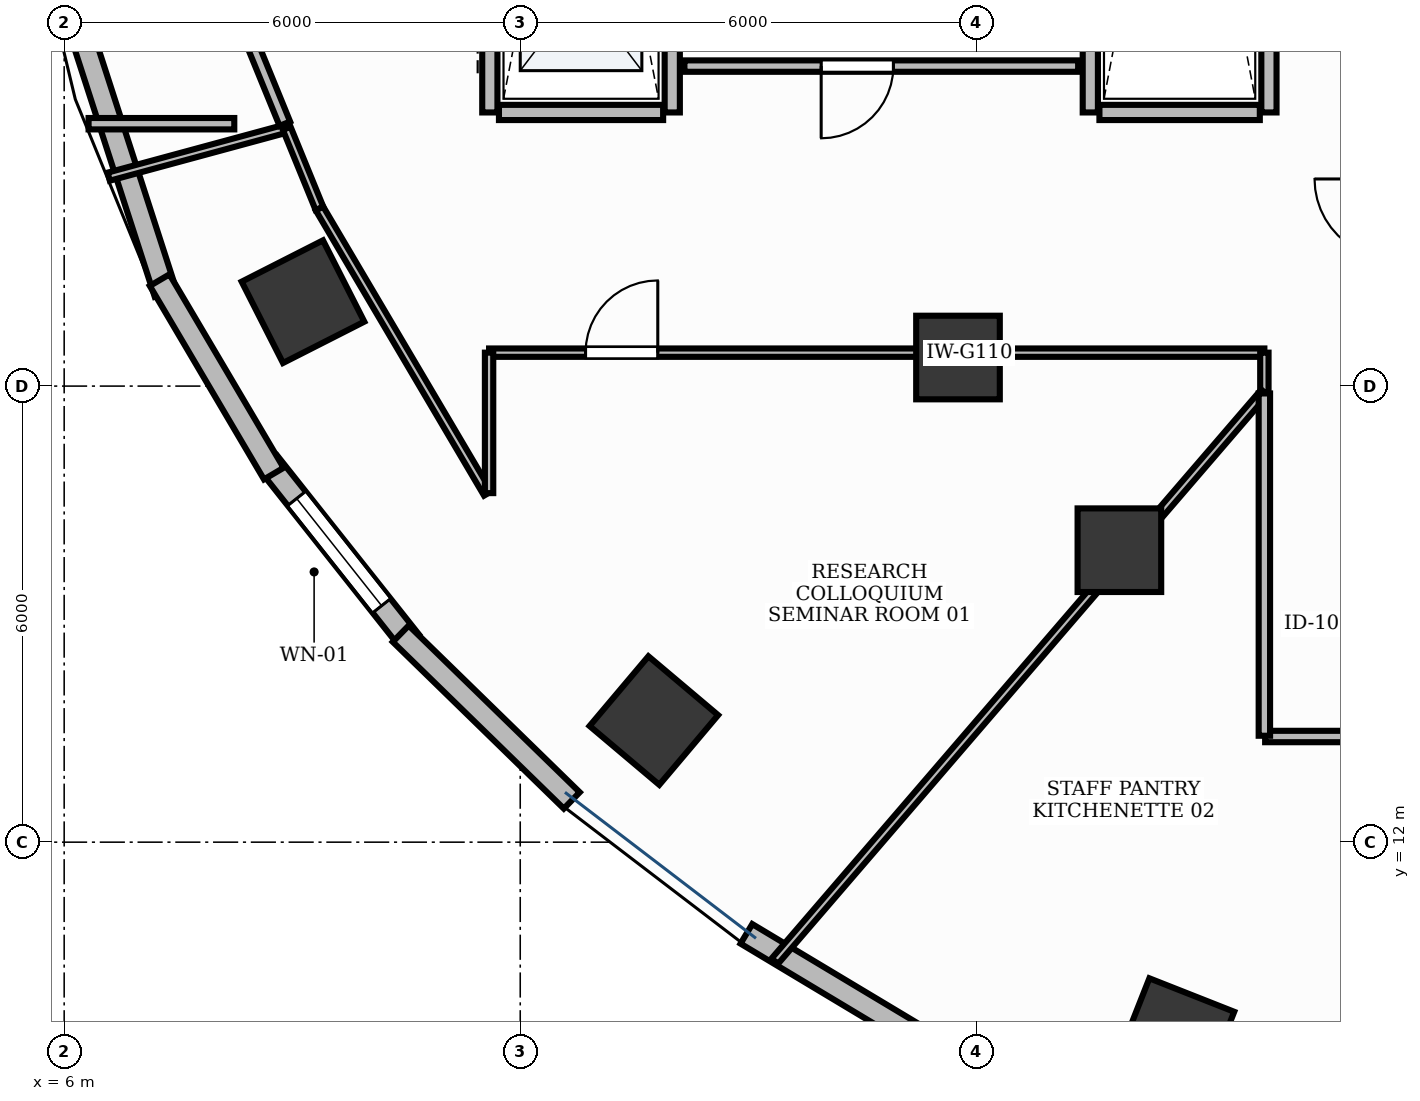
"""IFC4 building model, lengths in metres.
Left out: names, types, materials, properties, quantities, classifications, styles, units other than length and angle.
Written with IfcOpenShell. Run it as: python <this file> out.ifc"""

import sys

from ifc_helpers import new_model, si_unit, direction, frame, frame_2d, origin, origin_2d, place, context, subcontext, project, spatial, rectangle, extrude, element, fill, save


model = new_model("IFC4")
c1 = context("Model", 3, precision=1e-05, world=origin(), true_north=direction((0.0, 1.0)))
c2 = subcontext(c1, "Body", "Model", "MODEL_VIEW")
j1 = project(units=[si_unit("LENGTHUNIT", "METRE"), si_unit("PLANEANGLEUNIT", "RADIAN")], contexts=[c1])
p1 = place(None, origin())
s1 = spatial("IfcSite", under=j1, at=p1, CompositionType="ELEMENT")
p2 = place(p1, origin())
s2 = spatial("IfcBuilding", under=s1, at=p2, CompositionType="ELEMENT")
p3 = place(p2, frame((0.0, 0.0, 111.0)))
s3 = spatial("IfcBuildingStorey", under=s2, at=p3, CompositionType="ELEMENT", Elevation=111.0)
p4 = place(p3, frame((9.142, 19.111, -0.0), z_axis=(0.0, 0.0, 1.0), x_axis=(-0.453057191132, 0.891481453292, 0.0)))
e1 = element("IfcColumn", 1, at=p4, inside=s3, PredefinedType="COLUMN", context=c2, shape_type="SweptSolid", body=[
    extrude(rectangle(XDim=1.2, YDim=1.2, at=origin_2d()), origin(), (0.0, 0.0, 1.0), 3.901),
])
p5 = place(p3, frame((17.759, 18.376, -0.0), z_axis=(0.0, 0.0, 1.0), x_axis=(1.0, 0.0, 0.0)))
e2 = element("IfcColumn", 2, at=p5, inside=s3, PredefinedType="COLUMN", context=c2, shape_type="SweptSolid", body=[
    extrude(rectangle(XDim=1.1, YDim=1.1, at=origin_2d()), origin(), (0.0, 0.0, 1.0), 3.901),
])
p6 = place(p3, frame((13.758, 13.6, -0.0), z_axis=(0.0, 0.0, 1.0), x_axis=(-0.764246456939, 0.644924300253, 0.0)))
e3 = element("IfcColumn", 3, at=p6, inside=s3, PredefinedType="COLUMN", context=c2, shape_type="SweptSolid", body=[
    extrude(rectangle(XDim=1.2, YDim=1.2, at=origin_2d()), origin(), (0.0, 0.0, 1.0), 3.901),
])
p7 = place(p3, frame((19.883, 15.841, -0.0), z_axis=(0.0, 0.0, 1.0), x_axis=(1.0, 0.0, 0.0)))
e4 = element("IfcColumn", 4, at=p7, inside=s3, PredefinedType="COLUMN", context=c2, shape_type="SweptSolid", body=[
    extrude(rectangle(XDim=1.1, YDim=1.1, at=origin_2d()), origin(), (0.0, 0.0, 1.0), 3.901),
])
p8 = place(p3, frame((20.615, 9.431, -0.0), z_axis=(0.0, 0.0, 1.0), x_axis=(-0.930225540858, 0.366988341962, 0.0)))
e5 = element("IfcColumn", 5, at=p8, inside=s3, PredefinedType="COLUMN", context=c2, shape_type="SweptSolid", body=[
    extrude(rectangle(XDim=1.2, YDim=1.2, at=origin_2d()), origin(), (0.0, 0.0, 1.0), 3.901),
])
p9 = place(p3, frame((8.685, 16.993, 0.0), z_axis=(0.0, 0.0, 1.0), x_axis=(0.620971431761, -0.783833197139, 0.0)))
e6 = element("IfcWall", 6, at=p9, inside=s3, PredefinedType="STANDARD", context=c2, shape_type="SweptSolid", body=[
    extrude(rectangle(XDim=3.004, YDim=0.3, at=frame_2d((1.502, 0.0))), origin(), (0.0, 0.0, 1.0), 3.9),
])
p10 = place(p9, frame((0.602, 0.0, 0.9)))
e7 = element("IfcOpeningElement", 7, at=p10, cuts=e6, PredefinedType="OPENING", context=c2, shape_type="SweptSolid", body=[
    extrude(rectangle(XDim=1.8, YDim=2.1, at=frame_2d((0.9, 1.05))), frame((0.0, 0.165, 0.0), z_axis=(0.0, -1.0, 0.0), x_axis=(1.0, 0.0, 0.0)), (0.0, 0.0, 1.0), 0.33),
])
p11 = place(p3, frame((5.632, 24.487, 0.0), z_axis=(0.0, 0.0, 1.0), x_axis=(0.307599470659, -0.951515930319, 0.0)))
e8 = element("IfcWall", 8, at=p11, inside=s3, PredefinedType="STANDARD", context=c2, shape_type="SweptSolid", body=[
    extrude(rectangle(XDim=5.534, YDim=0.3, at=frame_2d((2.767, 0.0))), origin(), (0.0, 0.0, 1.0), 3.9),
])
p12 = place(p3, frame((7.256, 19.394, 0.0), z_axis=(0.0, 0.0, 1.0), x_axis=(0.508200342003, -0.861238882302, 0.0)))
e9 = element("IfcWall", 9, at=p12, inside=s3, PredefinedType="STANDARD", context=c2, shape_type="SweptSolid", body=[
    extrude(rectangle(XDim=2.955, YDim=0.3, at=frame_2d((1.478, 0.0))), origin(), (0.0, 0.0, 1.0), 3.47),
])
p13 = place(p3, frame((10.428, 14.742, 0.0), z_axis=(0.0, 0.0, 1.0), x_axis=(0.716101112291, -0.69799655943, 0.0)))
e10 = element("IfcWall", 10, at=p13, inside=s3, PredefinedType="STANDARD", context=c2, shape_type="SweptSolid", body=[
    extrude(rectangle(XDim=3.142, YDim=0.3, at=frame_2d((1.571, 0.0))), origin(), (0.0, 0.0, 1.0), 3.47),
])
p14 = place(p3, frame((14.976, 10.794, 0.0), z_axis=(0.0, 0.0, 1.0), x_axis=(0.857602536704, -0.514313026316, 0.0)))
e11 = element("IfcWall", 11, at=p14, inside=s3, PredefinedType="STANDARD", context=c2, shape_type="SweptSolid", body=[
    extrude(rectangle(XDim=3.34, YDim=0.3, at=frame_2d((1.67, 0.0))), origin(), (0.0, 0.0, 1.0), 3.9),
])
p15 = place(p3, frame((11.6, 21.6, 0.0), z_axis=(0.0, 0.0, 1.0), x_axis=(0.0, 1.0, 0.0)))
e12 = element("IfcWall", 12, at=p15, inside=s3, PredefinedType="PARTITIONING", context=c2, shape_type="SweptSolid", body=[
    extrude(rectangle(XDim=10.8, YDim=0.2, at=frame_2d((5.4, 0.0))), origin(), (0.0, 0.0, 1.0), 2.91),
])
p16 = place(p15, frame((0.9, 0.0, 0.0)))
e13 = element("IfcOpeningElement", 13, at=p16, cuts=e12, PredefinedType="OPENING", context=c2, shape_type="SweptSolid", body=[
    extrude(rectangle(XDim=1.1, YDim=2.2, at=frame_2d((0.55, 1.1))), frame((0.0, 0.115, 0.0), z_axis=(0.0, -1.0, 0.0), x_axis=(1.0, 0.0, 0.0)), (0.0, 0.0, 1.0), 0.23),
])
p17 = place(p15, frame((3.6, 0.0, 0.0)))
e14 = element("IfcOpeningElement", 14, at=p17, cuts=e12, PredefinedType="OPENING", context=c2, shape_type="SweptSolid", body=[
    extrude(rectangle(XDim=1.1, YDim=2.2, at=frame_2d((0.55, 1.1))), frame((0.0, 0.115, 0.0), z_axis=(0.0, -1.0, 0.0), x_axis=(1.0, 0.0, 0.0)), (0.0, 0.0, 1.0), 0.23),
])
p18 = place(p15, frame((6.3, 0.0, 0.0)))
e15 = element("IfcOpeningElement", 15, at=p18, cuts=e12, PredefinedType="OPENING", context=c2, shape_type="SweptSolid", body=[
    extrude(rectangle(XDim=1.1, YDim=2.2, at=frame_2d((0.55, 1.1))), frame((0.0, 0.115, 0.0), z_axis=(0.0, -1.0, 0.0), x_axis=(1.0, 0.0, 0.0)), (0.0, 0.0, 1.0), 0.23),
])
p19 = place(p15, frame((9.0, 0.0, 0.0)))
e16 = element("IfcOpeningElement", 16, at=p19, cuts=e12, PredefinedType="OPENING", context=c2, shape_type="SweptSolid", body=[
    extrude(rectangle(XDim=1.1, YDim=2.2, at=frame_2d((0.55, 1.1))), frame((0.0, 0.115, 0.0), z_axis=(0.0, -1.0, 0.0), x_axis=(1.0, 0.0, 0.0)), (0.0, 0.0, 1.0), 0.23),
])
p20 = place(p3, frame((14.0, 21.6, 0.0), z_axis=(0.0, 0.0, 1.0), x_axis=(0.0, 1.0, 0.0)))
e17 = element("IfcWall", 17, at=p20, inside=s3, PredefinedType="PARTITIONING", context=c2, shape_type="SweptSolid", body=[
    extrude(rectangle(XDim=10.8, YDim=0.2, at=frame_2d((5.4, 0.0))), origin(), (0.0, 0.0, 1.0), 2.91),
])
p21 = place(p3, frame((11.72, 21.6, 0.0), z_axis=(0.0, 0.0, 1.0), x_axis=(1.0, 0.0, 0.0)))
e18 = element("IfcWall", 18, at=p21, inside=s3, PredefinedType="PARTITIONING", context=c2, shape_type="SweptSolid", body=[
    extrude(rectangle(XDim=2.16, YDim=0.2, at=frame_2d((1.08, 0.0))), origin(), (0.0, 0.0, 1.0), 2.91),
])
for number, where, z_axis, x_axis in (
    (19, (19.5, 21.6, 0.0), (0.0, 0.0, 1.0), (0.0, 1.0, 0.0)),
    (20, (21.85, 21.6, 0.0), (0.0, 0.0, 1.0), (0.0, 1.0, 0.0)),
):
    element("IfcWall", number, at=place(p3, frame(where, z_axis=z_axis, x_axis=x_axis)), inside=s3, PredefinedType="PARTITIONING", context=c2, shape_type="SweptSolid", body=[
        extrude(rectangle(XDim=10.8, YDim=0.2, at=frame_2d((5.4, 0.0))), origin(), (0.0, 0.0, 1.0), 2.91),
    ])
p22 = place(p3, frame((19.62, 21.6, 0.0), z_axis=(0.0, 0.0, 1.0), x_axis=(1.0, 0.0, 0.0)))
e21 = element("IfcWall", 21, at=p22, inside=s3, PredefinedType="PARTITIONING", context=c2, shape_type="SweptSolid", body=[
    extrude(rectangle(XDim=2.11, YDim=0.2, at=frame_2d((1.055, 0.0))), origin(), (0.0, 0.0, 1.0), 2.91),
])
p23 = place(p3, frame((11.59, 18.44, 0.0), z_axis=(0.0, 0.0, 1.0), x_axis=(1.0, 0.0, 0.0)))
e22 = element("IfcWall", 22, at=p23, inside=s3, PredefinedType="MOVABLE", context=c2, shape_type="SweptSolid", body=[
    extrude(rectangle(XDim=10.2, YDim=0.11, at=frame_2d((5.1, 0.0))), origin(), (0.0, 0.0, 1.0), 2.91),
])
p24 = place(p23, frame((1.27, 0.0, 0.0)))
e23 = element("IfcOpeningElement", 23, at=p24, cuts=e22, PredefinedType="OPENING", context=c2, shape_type="SweptSolid", body=[
    extrude(rectangle(XDim=0.95, YDim=2.15, at=frame_2d((0.475, 1.075))), frame((0.0, 0.07, 0.0), z_axis=(0.0, -1.0, 0.0), x_axis=(1.0, 0.0, 0.0)), (0.0, 0.0, 1.0), 0.14),
])
p25 = place(p3, frame((21.8, 13.39, 0.0), z_axis=(0.0, 0.0, 1.0), x_axis=(1.0, 0.0, 0.0)))
e24 = element("IfcWall", 24, at=p25, inside=s3, PredefinedType="PARTITIONING", context=c2, shape_type="SweptSolid", body=[
    extrude(rectangle(XDim=4.159, YDim=0.15, at=frame_2d((2.079, 0.0))), origin(), (0.0, 0.0, 1.0), 2.91),
])
p26 = place(p25, frame((1.052, 0.0, 0.0)))
e25 = element("IfcOpeningElement", 25, at=p26, cuts=e24, PredefinedType="OPENING", context=c2, shape_type="SweptSolid", body=[
    extrude(rectangle(XDim=0.95, YDim=2.15, at=frame_2d((0.475, 1.075))), frame((0.0, 0.09, 0.0), z_axis=(0.0, -1.0, 0.0), x_axis=(1.0, 0.0, 0.0)), (0.0, 0.0, 1.0), 0.18),
])
p27 = place(p3, frame((19.34, 22.21, 0.0), z_axis=(0.0, 0.0, 1.0), x_axis=(-1.0, 0.0, 0.0)))
e26 = element("IfcWall", 26, at=p27, inside=s3, PredefinedType="PARTITIONING", context=c2, shape_type="SweptSolid", body=[
    extrude(rectangle(XDim=5.18, YDim=0.15, at=frame_2d((2.59, 0.0))), origin(), (0.0, 0.0, 1.0), 2.91),
])
p28 = place(p27, frame((2.431, 0.0, 0.0)))
e27 = element("IfcOpeningElement", 27, at=p28, cuts=e26, PredefinedType="OPENING", context=c2, shape_type="SweptSolid", body=[
    extrude(rectangle(XDim=0.95, YDim=2.15, at=frame_2d((0.475, 1.075))), frame((0.0, 0.09, 0.0), z_axis=(0.0, -1.0, 0.0), x_axis=(1.0, 0.0, 0.0)), (0.0, 0.0, 1.0), 0.18),
])
p29 = place(p3, frame((6.586, 20.755, 0.0), z_axis=(0.0, 0.0, 1.0), x_axis=(0.965145928014, 0.26171231847, 0.0)))
e28 = element("IfcWall", 28, at=p29, inside=s3, PredefinedType="MOVABLE", context=c2, shape_type="SweptSolid", body=[
    extrude(rectangle(XDim=2.426, YDim=0.11, at=frame_2d((1.213, 0.0))), origin(), (0.0, 0.0, 1.0), 2.91),
])
p30 = place(p3, frame((8.928, 21.39, 0.0), z_axis=(0.0, 0.0, 1.0), x_axis=(0.378373768339, -0.925652900083, 0.0)))
e29 = element("IfcWall", 29, at=p30, inside=s3, PredefinedType="MOVABLE", context=c2, shape_type="SweptSolid", body=[
    extrude(rectangle(XDim=1.137, YDim=0.11, at=frame_2d((0.569, 0.0))), origin(), (0.0, 0.0, 1.0), 2.91),
])
p31 = place(p3, frame((9.359, 20.336, 0.0), z_axis=(0.0, 0.0, 1.0), x_axis=(0.508164254342, -0.86126017591, 0.0)))
e30 = element("IfcWall", 30, at=p31, inside=s3, PredefinedType="MOVABLE", context=c2, shape_type="SweptSolid", body=[
    extrude(rectangle(XDim=4.353, YDim=0.11, at=frame_2d((2.177, 0.0))), origin(), (0.0, 0.0, 1.0), 2.91),
])
p32 = place(p3, frame((11.59, 16.592, 0.0), z_axis=(0.0, 0.0, 1.0), x_axis=(0.0, 1.0, 0.0)))
e31 = element("IfcWall", 31, at=p32, inside=s3, PredefinedType="MOVABLE", context=c2, shape_type="SweptSolid", body=[
    extrude(rectangle(XDim=1.848, YDim=0.11, at=frame_2d((0.924, 0.0))), origin(), (0.0, 0.0, 1.0), 2.91),
])
p33 = place(p3, frame((21.79, 18.44, 0.0), z_axis=(0.0, 0.0, 1.0), x_axis=(0.0, -1.0, 0.0)))
e32 = element("IfcWall", 32, at=p33, inside=s3, PredefinedType="MOVABLE", context=c2, shape_type="SweptSolid", body=[
    extrude(rectangle(XDim=0.521, YDim=0.11, at=frame_2d((0.261, 0.0))), origin(), (0.0, 0.0, 1.0), 2.91),
])
p34 = place(p3, frame((21.79, 17.919, 0.0), z_axis=(0.0, 0.0, 1.0), x_axis=(-0.652278586957, -0.757979316999, 0.0)))
e33 = element("IfcWall", 33, at=p34, inside=s3, PredefinedType="MOVABLE", context=c2, shape_type="SweptSolid", body=[
    extrude(rectangle(XDim=9.874, YDim=0.11, at=frame_2d((4.937, 0.0))), origin(), (0.0, 0.0, 1.0), 2.91),
])
p35 = place(p3, frame((21.79, 17.903, 0.0), z_axis=(0.0, 0.0, 1.0), x_axis=(0.0, -1.0, 0.0)))
e34 = element("IfcWall", 34, at=p35, inside=s3, PredefinedType="PARTITIONING", context=c2, shape_type="SweptSolid", body=[
    extrude(rectangle(XDim=4.503, YDim=0.15, at=frame_2d((2.252, 0.0))), origin(), (0.0, 0.0, 1.0), 2.91),
])
p36 = place(p3, frame((8.466, 22.52, 0.0), z_axis=(0.0, 0.0, 1.0), x_axis=(0.378237433206, -0.925708617288, 0.0)))
e35 = element("IfcWall", 35, at=p36, inside=s3, PredefinedType="PARTITIONING", context=c2, shape_type="SweptSolid", body=[
    extrude(rectangle(XDim=1.154, YDim=0.15, at=frame_2d((0.577, 0.0))), origin(), (0.0, 0.0, 1.0), 2.91),
])
p37 = place(p3, frame((8.238, 21.452, 0.0), z_axis=(0.0, 0.0, 1.0), x_axis=(-1.0, 0.0, 0.0)))
e36 = element("IfcWall", 36, at=p37, inside=s3, PredefinedType="PARTITIONING", context=c2, shape_type="SweptSolid", body=[
    extrude(rectangle(XDim=1.917, YDim=0.15, at=frame_2d((0.958, 0.0))), origin(), (0.0, 0.0, 1.0), 2.91),
])
p38 = place(p10, origin())
e37 = element("IfcWindow", 37, at=p38, inside=s3, PartitioningType="SINGLE_PANEL", PredefinedType="WINDOW", context=c2, shape_type="SweptSolid", body=[
    extrude(rectangle(XDim=1.8, YDim=2.1, at=frame_2d((0.9, 1.05))), frame((0.0, 0.03, 0.0), z_axis=(0.0, -1.0, 0.0), x_axis=(1.0, 0.0, 0.0)), (0.0, 0.0, 1.0), 0.06),
])
fill(e7, e37)
p39 = place(p24, origin())
e38 = element("IfcDoor", 38, at=p39, inside=s3, OperationType="SINGLE_SWING_RIGHT", PredefinedType="DOOR", context=c2, shape_type="SweptSolid", body=[
    extrude(rectangle(XDim=0.95, YDim=2.15, at=frame_2d((0.475, 1.075))), frame((0.0, 0.025, 0.0), z_axis=(0.0, -1.0, 0.0), x_axis=(1.0, 0.0, 0.0)), (0.0, 0.0, 1.0), 0.05),
])
fill(e23, e38)
p40 = place(p28, origin())
e39 = element("IfcDoor", 39, at=p40, inside=s3, OperationType="SINGLE_SWING_RIGHT", PredefinedType="DOOR", context=c2, shape_type="SweptSolid", body=[
    extrude(rectangle(XDim=0.95, YDim=2.15, at=frame_2d((0.475, 1.075))), frame((0.0, 0.025, 0.0), z_axis=(0.0, -1.0, 0.0), x_axis=(1.0, 0.0, 0.0)), (0.0, 0.0, 1.0), 0.05),
])
fill(e27, e39)
save(model, sys.argv[1])
